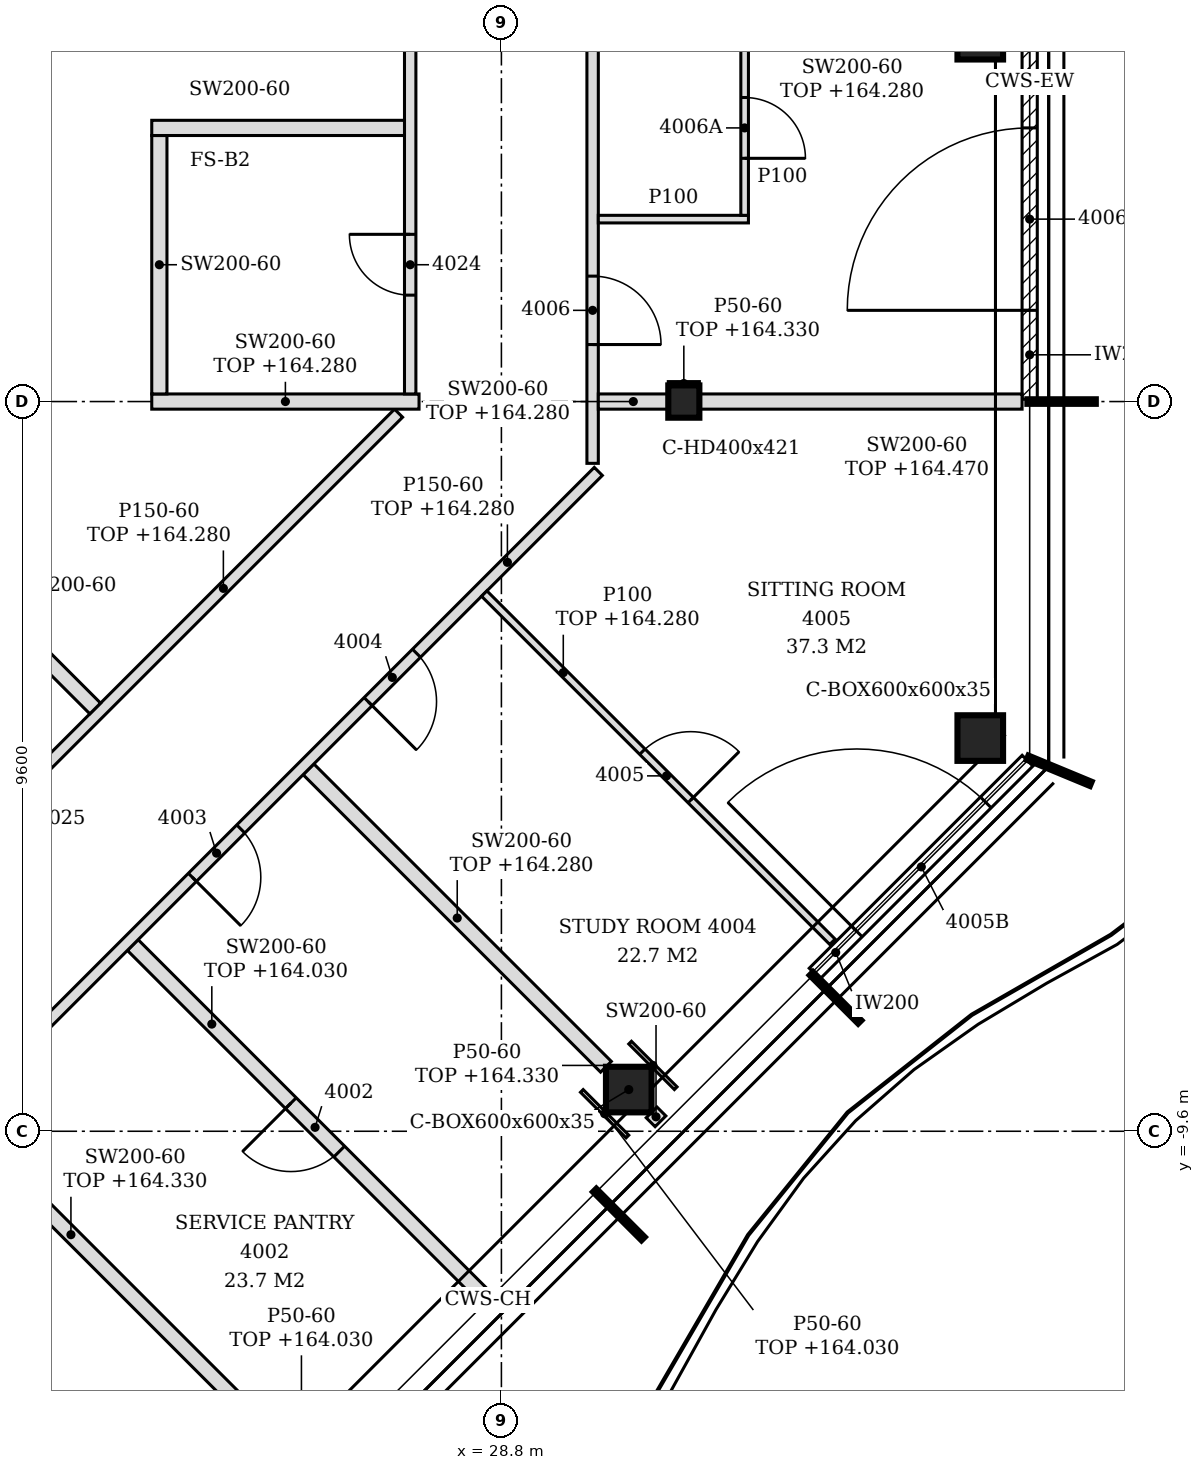
"""IFC4 building model, lengths in metres.
Left out: names, types, materials, properties, quantities, classifications, styles, units other than length and angle.
Written with IfcOpenShell. Run it as: python <this file> out.ifc"""

import sys

from ifc_helpers import new_model, si_unit, direction, frame, frame_2d, origin, origin_2d, place, context, subcontext, project, spatial, polyline, rectangle, hollow_rectangle, i_section, outline, extrude, element, fill, save


model = new_model("IFC4")
c1 = context("Model", 3, precision=1e-05, world=origin(), true_north=direction((0.0, 1.0)))
c2 = subcontext(c1, "Body", "Model", "MODEL_VIEW")
j1 = project(units=[si_unit("LENGTHUNIT", "METRE"), si_unit("PLANEANGLEUNIT", "RADIAN")], contexts=[c1])
p1 = place(None, origin())
s1 = spatial("IfcSite", under=j1, at=p1, CompositionType="ELEMENT")
p2 = place(p1, origin())
s2 = spatial("IfcBuilding", under=s1, at=p2, CompositionType="ELEMENT")
p3 = place(p2, frame((0.0, 0.0, 161.4)))
s3 = spatial("IfcBuildingStorey", under=s2, at=p3, CompositionType="ELEMENT", Elevation=161.4)
for number, where, z_axis, x_axis in (
    (1, (30.476, -9.052, -0.15), (0.0, 0.0, 1.0), (1.0, 0.0, 0.0)),
    (2, (35.1, -4.427, -0.15), (0.0, 0.0, 1.0), (1.0, 0.0, 0.0)),
    (3, (35.1, 4.8, -0.15), (0.0, 0.0, 1.0), (1.0, 0.0, 0.0)),
):
    element("IfcColumn", number, at=place(p3, frame(where, z_axis=z_axis, x_axis=x_axis)), inside=s3, PredefinedType="COLUMN", context=c2, shape_type="SweptSolid", body=[
        extrude(hollow_rectangle(XDim=0.6, YDim=0.6, WallThickness=0.035, at=origin_2d()), origin(), (0.0, 0.0, 1.0), 3.6),
    ])
p4 = place(p3, frame((31.2, 0.0, -0.15), z_axis=(0.0, 0.0, 1.0), x_axis=(1.0, 0.0, 0.0)))
e4 = element("IfcColumn", 4, at=p4, inside=s3, PredefinedType="COLUMN", context=c2, shape_type="SweptSolid", body=[
    extrude(i_section(OverallWidth=0.409, OverallDepth=0.425, WebThickness=0.033, FlangeThickness=0.052, FilletRadius=0.015, at=origin_2d()), origin(), (0.0, 0.0, 1.0), 3.6),
])
p5 = place(p3, frame((32.92, -7.526, 0.0), z_axis=(0.0, 0.0, 1.0), x_axis=(0.707106781187, 0.707106781187, 0.0)))
e5 = element("IfcWall", 5, at=p5, inside=s3, PredefinedType="NOTDEFINED", context=c2, shape_type="SweptSolid", body=[
    extrude(rectangle(XDim=3.962, YDim=0.2, at=frame_2d((1.981, 0.0))), origin(), (0.0, 0.0, 1.0), 3.45),
])
p6 = place(p5, frame((0.785, 0.0, 0.0)))
e6 = element("IfcOpeningElement", 6, at=p6, cuts=e5, PredefinedType="OPENING", context=c2, shape_type="SweptSolid", body=[
    extrude(rectangle(XDim=2.4, YDim=2.4, at=frame_2d((1.2, 1.2))), frame((0.0, 0.11, 0.0), z_axis=(0.0, -1.0, 0.0), x_axis=(1.0, 0.0, 0.0)), (0.0, 0.0, 1.0), 0.22),
])
p7 = place(p3, frame((35.75, 0.03, 0.0), z_axis=(0.0, 0.0, 1.0), x_axis=(0.0, 1.0, 0.0)))
e7 = element("IfcWall", 7, at=p7, inside=s3, PredefinedType="NOTDEFINED", context=c2, shape_type="SweptSolid", body=[
    extrude(rectangle(XDim=4.74, YDim=0.2, at=frame_2d((2.37, 0.0))), origin(), (0.0, 0.0, 1.0), 3.45),
])
p8 = place(p7, frame((1.17, 0.0, 0.0)))
e8 = element("IfcOpeningElement", 8, at=p8, cuts=e7, PredefinedType="OPENING", context=c2, shape_type="SweptSolid", body=[
    extrude(rectangle(XDim=2.4, YDim=2.4, at=frame_2d((1.2, 1.2))), frame((0.0, 0.11, 0.0), z_axis=(0.0, -1.0, 0.0), x_axis=(1.0, 0.0, 0.0)), (0.0, 0.0, 1.0), 0.22),
])
p9 = place(p3, frame((25.552, -13.375, 0.0), z_axis=(0.0, 0.0, 1.0), x_axis=(-0.707106781187, 0.707106781187, 0.0)))
e9 = element("IfcWall", 9, at=p9, inside=s3, PredefinedType="PARTITIONING", context=c2, shape_type="SweptSolid", body=[
    extrude(rectangle(XDim=6.83, YDim=0.2, at=frame_2d((3.415, 0.0))), origin(), (0.0, 0.0, 1.0), 2.93),
])
p10 = place(p3, frame((28.581, -11.781, 0.0), z_axis=(0.0, 0.0, 1.0), x_axis=(-0.707106781187, 0.707106781187, 0.0)))
e10 = element("IfcWall", 10, at=p10, inside=s3, PredefinedType="PARTITIONING", context=c2, shape_type="SweptSolid", body=[
    extrude(rectangle(XDim=6.549, YDim=0.2, at=frame_2d((3.274, 0.0))), origin(), (0.0, 0.0, 1.0), 2.63),
])
p11 = place(p10, frame((2.707, 0.0, 0.0)))
e11 = element("IfcOpeningElement", 11, at=p11, cuts=e10, PredefinedType="OPENING", context=c2, shape_type="SweptSolid", body=[
    extrude(rectangle(XDim=0.9, YDim=2.1, at=frame_2d((0.45, 1.05))), frame((0.0, 0.11, 0.0), z_axis=(0.0, -1.0, 0.0), x_axis=(1.0, 0.0, 0.0)), (0.0, 0.0, 1.0), 0.22),
])
p12 = place(p3, frame((30.893, -9.469, 0.0), z_axis=(0.0, 0.0, 1.0), x_axis=(-0.707106781187, 0.707106781187, 0.0)))
e12 = element("IfcWall", 12, at=p12, inside=s3, PredefinedType="PARTITIONING", context=c2, shape_type="SweptSolid", body=[
    extrude(rectangle(XDim=0.166, YDim=0.2, at=frame_2d((0.083, 0.0))), origin(), (0.0, 0.0, 1.0), 3.45),
])
p13 = place(p3, frame((30.176, -8.752, 0.0), z_axis=(0.0, 0.0, 1.0), x_axis=(-0.707084725798, 0.707128835887, 0.0)))
e13 = element("IfcWall", 13, at=p13, inside=s3, PredefinedType="PARTITIONING", context=c2, shape_type="SweptSolid", body=[
    extrude(rectangle(XDim=5.535, YDim=0.2, at=frame_2d((2.768, 0.0))), origin(), (0.0, 0.0, 1.0), 2.88),
])
p14 = place(p3, frame((22.722, -8.272, 0.0), z_axis=(0.0, 0.0, 1.0), x_axis=(0.707106781187, 0.707106781187, 0.0)))
e14 = element("IfcWall", 14, at=p14, inside=s3, PredefinedType="PARTITIONING", context=c2, shape_type="SweptSolid", body=[
    extrude(rectangle(XDim=10.399, YDim=0.15, at=frame_2d((5.199, 0.0))), origin(), (0.0, 0.0, 1.0), 2.88),
])
p15 = place(p14, frame((2.846, 0.0, 0.0)))
e15 = element("IfcOpeningElement", 15, at=p15, cuts=e14, PredefinedType="OPENING", context=c2, shape_type="SweptSolid", body=[
    extrude(rectangle(XDim=0.9, YDim=2.1, at=frame_2d((0.45, 1.05))), frame((0.0, 0.085, 0.0), z_axis=(0.0, -1.0, 0.0), x_axis=(1.0, 0.0, 0.0)), (0.0, 0.0, 1.0), 0.17),
])
p16 = place(p14, frame((6.116, 0.0, 0.0)))
e16 = element("IfcOpeningElement", 16, at=p16, cuts=e14, PredefinedType="OPENING", context=c2, shape_type="SweptSolid", body=[
    extrude(rectangle(XDim=0.9, YDim=2.1, at=frame_2d((0.45, 1.05))), frame((0.0, 0.085, 0.0), z_axis=(0.0, -1.0, 0.0), x_axis=(1.0, 0.0, 0.0)), (0.0, 0.0, 1.0), 0.17),
])
p17 = place(p3, frame((33.155, -7.107, 0.0), z_axis=(0.0, 0.0, 1.0), x_axis=(-0.70708794033, 0.707125621541, 0.0)))
e17 = element("IfcWall", 17, at=p17, inside=s3, PredefinedType="PARTITIONING", context=c2, shape_type="SweptSolid", body=[
    extrude(rectangle(XDim=6.479, YDim=0.1, at=frame_2d((3.24, 0.0))), origin(), (0.0, 0.0, 1.0), 2.88),
])
p18 = place(p17, frame((2.637, 0.0, 0.0)))
e18 = element("IfcOpeningElement", 18, at=p18, cuts=e17, PredefinedType="OPENING", context=c2, shape_type="SweptSolid", body=[
    extrude(rectangle(XDim=0.9, YDim=2.1, at=frame_2d((0.45, 1.05))), frame((0.0, 0.06, 0.0), z_axis=(0.0, -1.0, 0.0), x_axis=(1.0, 0.0, 0.0)), (0.0, 0.0, 1.0), 0.12),
])
p19 = place(p3, frame((21.671, -5.929, 0.0), z_axis=(0.0, 0.0, 1.0), x_axis=(0.707121724429, 0.707091837628, 0.0)))
e19 = element("IfcWall", 19, at=p19, inside=s3, PredefinedType="PARTITIONING", context=c2, shape_type="SweptSolid", body=[
    extrude(rectangle(XDim=8.169, YDim=0.15, at=frame_2d((4.084, 0.0))), origin(), (0.0, 0.0, 1.0), 2.88),
])
p20 = place(p19, frame((0.85, 0.0, 0.0)))
e20 = element("IfcOpeningElement", 20, at=p20, cuts=e19, PredefinedType="OPENING", context=c2, shape_type="SweptSolid", body=[
    extrude(rectangle(XDim=0.8, YDim=2.1, at=frame_2d((0.4, 1.05))), frame((0.0, 0.085, 0.0), z_axis=(0.0, -1.0, 0.0), x_axis=(1.0, 0.0, 0.0)), (0.0, 0.0, 1.0), 0.17),
])
p21 = place(p3, frame((23.456, -4.038, 0.0), z_axis=(0.0, 0.0, 1.0), x_axis=(-0.707106781187, 0.707106781187, 0.0)))
e21 = element("IfcWall", 21, at=p21, inside=s3, PredefinedType="PARTITIONING", context=c2, shape_type="SweptSolid", body=[
    extrude(rectangle(XDim=2.825, YDim=0.2, at=frame_2d((1.412, 0.0))), origin(), (0.0, 0.0, 1.0), 3.45),
])
p22 = place(p3, frame((30.0, -0.813, 0.0), z_axis=(0.0, 0.0, 1.0), x_axis=(0.0, 1.0, 0.0)))
e22 = element("IfcWall", 22, at=p22, inside=s3, PredefinedType="PARTITIONING", context=c2, shape_type="SweptSolid", body=[
    extrude(outline(polyline([(0.0, 0.0), (12.834, 0.0), (12.834, 3.45), (10.518, 3.45), (10.516, 2.88), (10.308, 2.88), (10.306, 3.45), (5.718, 3.45), (5.716, 2.88), (5.508, 2.88), (5.506, 3.45), (0.918, 3.45), (0.916, 2.88), (0.708, 2.88), (0.706, 3.45), (0.0, 3.45), (0.0, 0.0)])), frame((0.0, 0.075, 0.0), z_axis=(0.0, -1.0, 0.0), x_axis=(1.0, 0.0, 0.0)), (0.0, 0.0, 1.0), 0.15),
])
p23 = place(p22, frame((1.563, 0.0, 0.0)))
e23 = element("IfcOpeningElement", 23, at=p23, cuts=e22, PredefinedType="OPENING", context=c2, shape_type="SweptSolid", body=[
    extrude(rectangle(XDim=0.9, YDim=2.1, at=frame_2d((0.45, 1.05))), frame((0.0, 0.085, 0.0), z_axis=(0.0, -1.0, 0.0), x_axis=(1.0, 0.0, 0.0)), (0.0, 0.0, 1.0), 0.17),
])
p24 = place(p22, frame((8.763, 0.0, 0.0)))
e24 = element("IfcOpeningElement", 24, at=p24, cuts=e22, PredefinedType="OPENING", context=c2, shape_type="SweptSolid", body=[
    extrude(rectangle(XDim=0.9, YDim=2.1, at=frame_2d((0.45, 1.05))), frame((0.0, 0.085, 0.0), z_axis=(0.0, -1.0, 0.0), x_axis=(1.0, 0.0, 0.0)), (0.0, 0.0, 1.0), 0.17),
])
p25 = place(p22, frame((11.121, 0.0, 0.0)))
e25 = element("IfcOpeningElement", 25, at=p25, cuts=e22, PredefinedType="OPENING", context=c2, shape_type="SweptSolid", body=[
    extrude(rectangle(XDim=0.9, YDim=2.1, at=frame_2d((0.45, 1.05))), frame((0.0, 0.085, 0.0), z_axis=(0.0, -1.0, 0.0), x_axis=(1.0, 0.0, 0.0)), (0.0, 0.0, 1.0), 0.17),
])
p26 = place(p3, frame((24.2, 0.0, 0.0), z_axis=(0.0, 0.0, 1.0), x_axis=(1.0, 0.0, 0.0)))
e26 = element("IfcWall", 26, at=p26, inside=s3, PredefinedType="PARTITIONING", context=c2, shape_type="SweptSolid", body=[
    extrude(rectangle(XDim=3.516, YDim=0.2, at=frame_2d((1.758, 0.0))), origin(), (0.0, 0.0, 1.0), 2.88),
])
p27 = place(p3, frame((30.075, 0.0, 0.0), z_axis=(0.0, 0.0, 1.0), x_axis=(1.0, 0.0, 0.0)))
e27 = element("IfcWall", 27, at=p27, inside=s3, PredefinedType="PARTITIONING", context=c2, shape_type="SweptSolid", body=[
    extrude(rectangle(XDim=0.921, YDim=0.2, at=frame_2d((0.46, 0.0))), origin(), (0.0, 0.0, 1.0), 2.88),
])
p28 = place(p3, frame((31.405, 0.0, 0.0), z_axis=(0.0, 0.0, 1.0), x_axis=(1.0, 0.0, 0.0)))
e28 = element("IfcWall", 28, at=p28, inside=s3, PredefinedType="PARTITIONING", context=c2, shape_type="SweptSolid", body=[
    extrude(outline(polyline([(0.0, 0.0), (4.245, 0.0), (4.246, 3.07), (3.845, 3.07), (3.844, 2.93), (3.545, 2.93), (3.543, 3.07), (0.0, 3.07), (0.0, 0.0)])), frame((0.0, 0.1, 0.0), z_axis=(0.0, -1.0, 0.0), x_axis=(1.0, 0.0, 0.0)), (0.0, 0.0, 1.0), 0.2),
])
p29 = place(p3, frame((24.3, 0.1, 0.0), z_axis=(0.0, 0.0, 1.0), x_axis=(0.0, 1.0, 0.0)))
e29 = element("IfcWall", 29, at=p29, inside=s3, PredefinedType="PARTITIONING", context=c2, shape_type="SweptSolid", body=[
    extrude(outline(polyline([(0.0, 0.0), (3.4, 0.0), (3.4, 3.45), (0.005, 3.45), (0.003, 2.88), (0.0, 2.88), (0.0, 0.0)])), frame((0.0, 0.1, 0.0), z_axis=(0.0, -1.0, 0.0), x_axis=(1.0, 0.0, 0.0)), (0.0, 0.0, 1.0), 0.2),
])
p30 = place(p3, frame((27.6, 0.1, 0.0), z_axis=(0.0, 0.0, 1.0), x_axis=(0.0, 1.0, 0.0)))
e30 = element("IfcWall", 30, at=p30, inside=s3, PredefinedType="PARTITIONING", context=c2, shape_type="SweptSolid", body=[
    extrude(outline(polyline([(0.0, 0.0), (10.927, 0.0), (10.927, 3.45), (9.605, 3.45), (9.603, 2.88), (9.395, 2.88), (9.393, 3.45), (4.805, 3.45), (4.803, 2.88), (4.595, 2.88), (4.593, 3.45), (0.005, 3.45), (0.003, 2.88), (0.0, 2.88), (0.0, 0.0)])), frame((0.0, 0.075, 0.0), z_axis=(0.0, -1.0, 0.0), x_axis=(1.0, 0.0, 0.0)), (0.0, 0.0, 1.0), 0.15),
])
p31 = place(p30, frame((1.3, 0.0, 0.0)))
e31 = element("IfcOpeningElement", 31, at=p31, cuts=e30, PredefinedType="OPENING", context=c2, shape_type="SweptSolid", body=[
    extrude(rectangle(XDim=0.8, YDim=2.1, at=frame_2d((0.4, 1.05))), frame((0.0, 0.085, 0.0), z_axis=(0.0, -1.0, 0.0), x_axis=(1.0, 0.0, 0.0)), (0.0, 0.0, 1.0), 0.17),
])
p32 = place(p3, frame((30.075, 2.4, 0.0), z_axis=(0.0, 0.0, 1.0), x_axis=(1.0, 0.0, 0.0)))
e32 = element("IfcWall", 32, at=p32, inside=s3, PredefinedType="PARTITIONING", context=c2, shape_type="SweptSolid", body=[
    extrude(outline(polyline([(0.0, 0.0), (1.975, 0.0), (1.975, 3.45), (1.275, 3.45), (1.273, 2.93), (0.975, 2.93), (0.973, 3.45), (0.0, 3.45), (0.0, 0.0)])), frame((0.0, 0.05, 0.0), z_axis=(0.0, -1.0, 0.0), x_axis=(1.0, 0.0, 0.0)), (0.0, 0.0, 1.0), 0.1),
])
p33 = place(p3, frame((32.0, 2.45, 0.0), z_axis=(0.0, 0.0, 1.0), x_axis=(0.0, 1.0, 0.0)))
e33 = element("IfcWall", 33, at=p33, inside=s3, PredefinedType="PARTITIONING", context=c2, shape_type="SweptSolid", body=[
    extrude(rectangle(XDim=2.25, YDim=0.1, at=frame_2d((1.125, 0.0))), origin(), (0.0, 0.0, 1.0), 3.45),
])
p34 = place(p33, frame((0.75, 0.0, 0.0)))
e34 = element("IfcOpeningElement", 34, at=p34, cuts=e33, PredefinedType="OPENING", context=c2, shape_type="SweptSolid", body=[
    extrude(rectangle(XDim=0.8, YDim=2.1, at=frame_2d((0.4, 1.05))), frame((0.0, 0.06, 0.0), z_axis=(0.0, -1.0, 0.0), x_axis=(1.0, 0.0, 0.0)), (0.0, 0.0, 1.0), 0.12),
])
p35 = place(p3, frame((24.2, 3.6, 0.0), z_axis=(0.0, 0.0, 1.0), x_axis=(1.0, 0.0, 0.0)))
e35 = element("IfcWall", 35, at=p35, inside=s3, PredefinedType="PARTITIONING", context=c2, shape_type="SweptSolid", body=[
    extrude(rectangle(XDim=3.325, YDim=0.2, at=frame_2d((1.663, 0.0))), origin(), (0.0, 0.0, 1.0), 3.45),
])
p36 = place(p3, frame((30.458, -9.669, 0.0), z_axis=(0.0, 0.0, 1.0), x_axis=(-0.707106781187, 0.707106781187, 0.0)))
e36 = element("IfcWall", 36, at=p36, inside=s3, PredefinedType="PARTITIONING", context=c2, shape_type="SweptSolid", body=[
    extrude(rectangle(XDim=0.849, YDim=0.05, at=frame_2d((0.424, 0.0))), origin(), (0.0, 0.0, 1.0), 2.63),
])
p37 = place(p3, frame((31.094, -9.034, 0.0), z_axis=(0.0, 0.0, 1.0), x_axis=(-0.707250633645, 0.706962899457, 0.0)))
e37 = element("IfcWall", 37, at=p37, inside=s3, PredefinedType="PARTITIONING", context=c2, shape_type="SweptSolid", body=[
    extrude(rectangle(XDim=0.848, YDim=0.05, at=frame_2d((0.424, 0.0))), origin(), (0.0, 0.0, 1.0), 2.93),
])
p38 = place(p3, frame((30.996, 0.238, 0.0), z_axis=(0.0, 0.0, 1.0), x_axis=(1.0, 0.0, 0.0)))
e38 = element("IfcWall", 38, at=p38, inside=s3, PredefinedType="PARTITIONING", context=c2, shape_type="SweptSolid", body=[
    extrude(rectangle(XDim=0.409, YDim=0.05, at=frame_2d((0.205, 0.0))), origin(), (0.0, 0.0, 1.0), 2.93),
])
p39 = place(p6, origin())
e39 = element("IfcDoor", 39, at=p39, inside=s3, OperationType="SINGLE_SWING_LEFT", PredefinedType="DOOR", context=c2, shape_type="SweptSolid", body=[
    extrude(rectangle(XDim=2.4, YDim=2.4, at=frame_2d((1.2, 1.2))), frame((0.0, 0.025, 0.0), z_axis=(0.0, -1.0, 0.0), x_axis=(1.0, 0.0, 0.0)), (0.0, 0.0, 1.0), 0.05),
])
fill(e6, e39)
p40 = place(p8, origin())
e40 = element("IfcDoor", 40, at=p40, inside=s3, OperationType="SINGLE_SWING_LEFT", PredefinedType="DOOR", context=c2, shape_type="SweptSolid", body=[
    extrude(rectangle(XDim=2.4, YDim=2.4, at=frame_2d((1.2, 1.2))), frame((0.0, 0.025, 0.0), z_axis=(0.0, -1.0, 0.0), x_axis=(1.0, 0.0, 0.0)), (0.0, 0.0, 1.0), 0.05),
])
fill(e8, e40)
p41 = place(p11, origin())
e41 = element("IfcDoor", 41, at=p41, inside=s3, OperationType="SINGLE_SWING_RIGHT", PredefinedType="DOOR", context=c2, shape_type="SweptSolid", body=[
    extrude(rectangle(XDim=0.9, YDim=2.1, at=frame_2d((0.45, 1.05))), frame((0.0, 0.025, 0.0), z_axis=(0.0, -1.0, 0.0), x_axis=(1.0, 0.0, 0.0)), (0.0, 0.0, 1.0), 0.05),
])
fill(e11, e41)
p42 = place(p15, frame((0.9, 0.0, 0.0), z_axis=(0.0, 0.0, 1.0), x_axis=(-1.0, 0.0, 0.0)))
e42 = element("IfcDoor", 42, at=p42, inside=s3, OperationType="SINGLE_SWING_RIGHT", PredefinedType="DOOR", context=c2, shape_type="SweptSolid", body=[
    extrude(rectangle(XDim=0.9, YDim=2.1, at=frame_2d((0.45, 1.05))), frame((0.0, 0.025, 0.0), z_axis=(0.0, -1.0, 0.0), x_axis=(1.0, 0.0, 0.0)), (0.0, 0.0, 1.0), 0.05),
])
fill(e15, e42)
p43 = place(p16, frame((0.9, 0.0, 0.0), z_axis=(0.0, 0.0, 1.0), x_axis=(-1.0, 0.0, 0.0)))
e43 = element("IfcDoor", 43, at=p43, inside=s3, OperationType="SINGLE_SWING_RIGHT", PredefinedType="DOOR", context=c2, shape_type="SweptSolid", body=[
    extrude(rectangle(XDim=0.9, YDim=2.1, at=frame_2d((0.45, 1.05))), frame((0.0, 0.025, 0.0), z_axis=(0.0, -1.0, 0.0), x_axis=(1.0, 0.0, 0.0)), (0.0, 0.0, 1.0), 0.05),
])
fill(e16, e43)
p44 = place(p18, frame((0.9, 0.0, 0.0), z_axis=(0.0, 0.0, 1.0), x_axis=(-1.0, 0.0, 0.0)))
e44 = element("IfcDoor", 44, at=p44, inside=s3, OperationType="SINGLE_SWING_RIGHT", PredefinedType="DOOR", context=c2, shape_type="SweptSolid", body=[
    extrude(rectangle(XDim=0.9, YDim=2.1, at=frame_2d((0.45, 1.05))), frame((0.0, 0.025, 0.0), z_axis=(0.0, -1.0, 0.0), x_axis=(1.0, 0.0, 0.0)), (0.0, 0.0, 1.0), 0.05),
])
fill(e18, e44)
p45 = place(p23, frame((0.9, 0.0, 0.0), z_axis=(0.0, 0.0, 1.0), x_axis=(-1.0, 0.0, 0.0)))
e45 = element("IfcDoor", 45, at=p45, inside=s3, OperationType="SINGLE_SWING_RIGHT", PredefinedType="DOOR", context=c2, shape_type="SweptSolid", body=[
    extrude(rectangle(XDim=0.9, YDim=2.1, at=frame_2d((0.45, 1.05))), frame((0.0, 0.025, 0.0), z_axis=(0.0, -1.0, 0.0), x_axis=(1.0, 0.0, 0.0)), (0.0, 0.0, 1.0), 0.05),
])
fill(e23, e45)
p46 = place(p34, frame((0.8, 0.0, 0.0), z_axis=(0.0, 0.0, 1.0), x_axis=(-1.0, 0.0, 0.0)))
e46 = element("IfcDoor", 46, at=p46, inside=s3, OperationType="SINGLE_SWING_RIGHT", PredefinedType="DOOR", context=c2, shape_type="SweptSolid", body=[
    extrude(rectangle(XDim=0.8, YDim=2.1, at=frame_2d((0.4, 1.05))), frame((0.0, 0.025, 0.0), z_axis=(0.0, -1.0, 0.0), x_axis=(1.0, 0.0, 0.0)), (0.0, 0.0, 1.0), 0.05),
])
fill(e34, e46)
p47 = place(p31, origin())
e47 = element("IfcDoor", 47, at=p47, inside=s3, OperationType="SINGLE_SWING_RIGHT", PredefinedType="DOOR", context=c2, shape_type="SweptSolid", body=[
    extrude(rectangle(XDim=0.8, YDim=2.1, at=frame_2d((0.4, 1.05))), frame((0.0, 0.025, 0.0), z_axis=(0.0, -1.0, 0.0), x_axis=(1.0, 0.0, 0.0)), (0.0, 0.0, 1.0), 0.05),
])
fill(e31, e47)
save(model, sys.argv[1])
